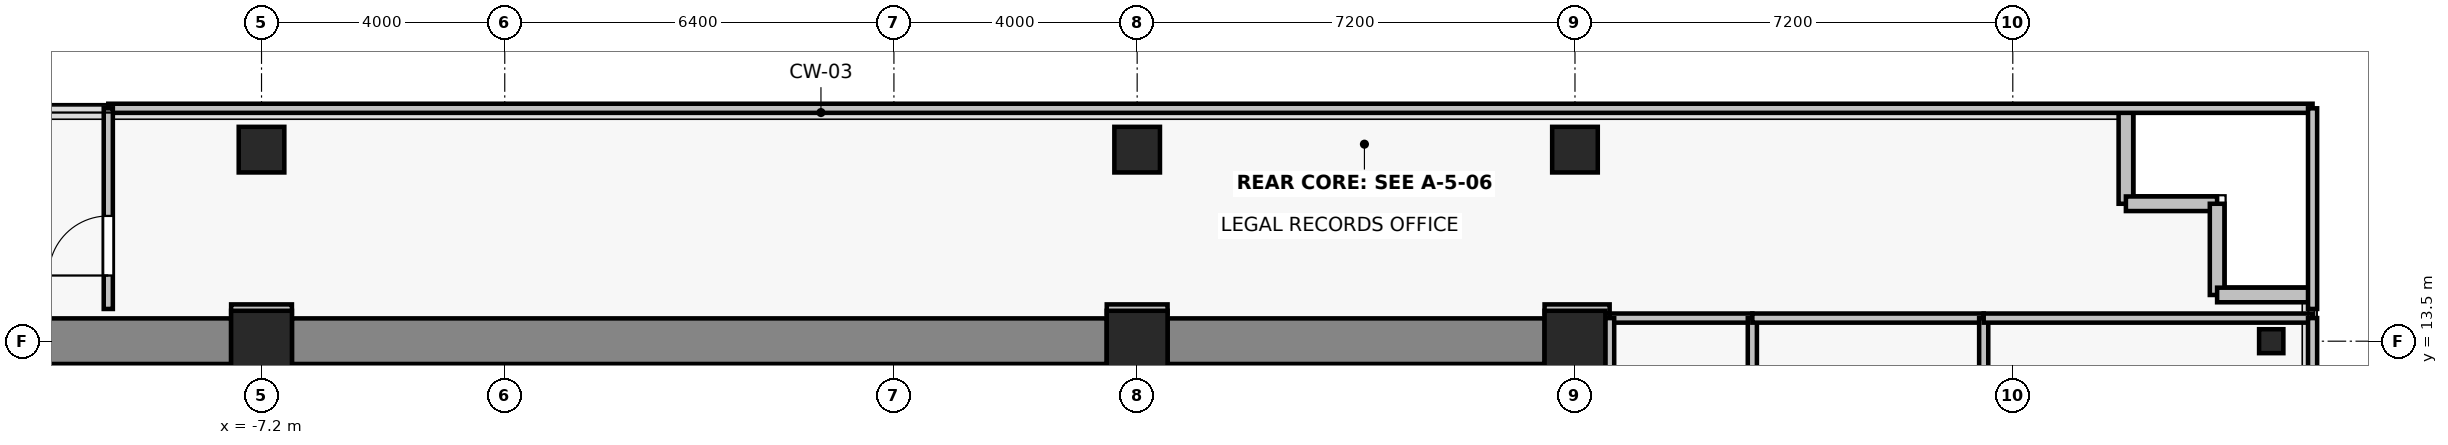
"""IFC4 building model, lengths in metres.
Left out: names, types, materials, properties, quantities, classifications, styles, units other than length and angle.
Written with IfcOpenShell. Run it as: python <this file> out.ifc"""

import sys

from ifc_helpers import new_model, si_unit, direction, frame, frame_2d, origin, origin_2d, place, context, subcontext, project, spatial, rectangle, i_section, extrude, source, transform, mapped, element, fill, save


model = new_model("IFC4")
c1 = context("Model", 3, precision=1e-05, world=origin(), true_north=direction((0.0, 1.0)))
c2 = subcontext(c1, "Body", "Model", "MODEL_VIEW")
j1 = project(units=[si_unit("LENGTHUNIT", "METRE"), si_unit("PLANEANGLEUNIT", "RADIAN")], contexts=[c1])
p1 = place(None, origin())
s1 = spatial("IfcSite", under=j1, at=p1, CompositionType="ELEMENT")
p2 = place(p1, origin())
s2 = spatial("IfcBuilding", under=s1, at=p2, CompositionType="ELEMENT")
p3 = place(p2, frame((0.0, 0.0, 192.4)))
s3 = spatial("IfcBuildingStorey", under=s2, at=p3, CompositionType="ELEMENT", Elevation=192.4)
for number, where, z_axis, x_axis in (
    (1, (-7.2, 13.5, 0.0), (0.0, 0.0, 1.0), (1.0, 0.0, 0.0)),
    (2, (7.2, 13.5, 0.0), (0.0, 0.0, 1.0), (1.0, 0.0, 0.0)),
    (3, (14.4, 13.5, 0.0), (0.0, 0.0, 1.0), (1.0, 0.0, 0.0)),
):
    element("IfcColumn", number, at=place(p3, frame(where, z_axis=z_axis, x_axis=x_axis)), inside=s3, PredefinedType="COLUMN", context=c2, shape_type="SweptSolid", body=[
        extrude(rectangle(XDim=1.0, YDim=1.0, at=origin_2d()), origin(), (0.0, 0.0, 1.0), 3.3),
    ])
for number, where, z_axis, x_axis in (
    (4, (-7.2, 16.65, 0.0), (0.0, 0.0, 1.0), (1.0, 0.0, 0.0)),
    (5, (7.2, 16.65, 0.0), (0.0, 0.0, 1.0), (1.0, 0.0, 0.0)),
    (6, (14.4, 16.65, 0.0), (0.0, 0.0, 1.0), (1.0, 0.0, 0.0)),
):
    element("IfcColumn", number, at=place(p3, frame(where, z_axis=z_axis, x_axis=x_axis)), inside=s3, PredefinedType="COLUMN", context=c2, shape_type="SweptSolid", body=[
        extrude(rectangle(XDim=0.75, YDim=0.75, at=origin_2d()), origin(), (0.0, 0.0, 1.0), 3.3),
    ])
p4 = place(p3, frame((25.85, 13.5, 0.0), z_axis=(0.0, 0.0, 1.0), x_axis=(1.0, 0.0, 0.0)))
e7 = element("IfcColumn", 7, at=p4, inside=s3, PredefinedType="COLUMN", context=c2, shape_type="SweptSolid", body=[
    extrude(i_section(OverallWidth=0.399, OverallDepth=0.394, WebThickness=0.023, FlangeThickness=0.037, FilletRadius=0.015, at=origin_2d()), origin(), (0.0, 0.0, 1.0), 3.3),
])
p5 = place(p3, frame((-13.9, 13.5, 0.0), z_axis=(0.0, 0.0, 1.0), x_axis=(1.0, 0.0, 0.0)))
e8 = element("IfcWall", 8, at=p5, inside=s3, PredefinedType="SHEAR", context=c2, shape_type="SweptSolid", body=[
    extrude(rectangle(XDim=6.2, YDim=0.75, at=frame_2d((3.1, 0.0))), origin(), (0.0, 0.0, 1.0), 3.075),
])
p6 = place(p3, frame((-6.7, 13.5, 0.0), z_axis=(0.0, 0.0, 1.0), x_axis=(1.0, 0.0, 0.0)))
e9 = element("IfcWall", 9, at=p6, inside=s3, PredefinedType="SHEAR", context=c2, shape_type="SweptSolid", body=[
    extrude(rectangle(XDim=13.4, YDim=0.75, at=frame_2d((6.7, 0.0))), origin(), (0.0, 0.0, 1.0), 3.075),
])
p7 = place(p3, frame((7.7, 13.5, 0.0), z_axis=(0.0, 0.0, 1.0), x_axis=(1.0, 0.0, 0.0)))
e10 = element("IfcWall", 10, at=p7, inside=s3, PredefinedType="SHEAR", context=c2, shape_type="SweptSolid", body=[
    extrude(rectangle(XDim=6.2, YDim=0.75, at=frame_2d((3.1, 0.0))), origin(), (0.0, 0.0, 1.0), 3.075),
])
for number, where, z_axis, x_axis in (
    (11, (23.46, 15.76, 0.0), (0.0, 0.0, 1.0), (0.0, 1.0, 0.0)),
    (12, (24.96, 15.76, 0.0), (0.0, 0.0, 1.0), (-1.0, 0.0, 0.0)),
    (13, (24.96, 14.26, 0.0), (0.0, 0.0, 1.0), (0.0, 1.0, 0.0)),
    (14, (26.46, 14.26, 0.0), (0.0, 0.0, 1.0), (-1.0, 0.0, 0.0)),
):
    element("IfcWall", number, at=place(p3, frame(where, z_axis=z_axis, x_axis=x_axis)), inside=s3, PredefinedType="SOLIDWALL", context=c2, shape_type="SweptSolid", body=[
        extrude(rectangle(XDim=1.5, YDim=0.24, at=frame_2d((0.75, 0.0))), origin(), (0.0, 0.0, 1.0), 3.075),
    ])
p8 = place(p3, frame((14.97, 13.88, 0.0), z_axis=(0.0, 0.0, 1.0), x_axis=(1.0, 0.0, 0.0)))
e15 = element("IfcWall", 15, at=p8, inside=s3, PredefinedType="PARTITIONING", context=c2, shape_type="SweptSolid", body=[
    extrude(rectangle(XDim=2.347, YDim=0.15, at=frame_2d((1.173, 0.0))), origin(), (0.0, 0.0, 1.0), 3.075),
])
p9 = place(p3, frame((14.97, 13.0, 0.0), z_axis=(0.0, 0.0, 1.0), x_axis=(0.0, 1.0, 0.0)))
e16 = element("IfcWall", 16, at=p9, inside=s3, PredefinedType="PARTITIONING", context=c2, shape_type="SweptSolid", body=[
    extrude(rectangle(XDim=0.88, YDim=0.15, at=frame_2d((0.44, 0.0))), origin(), (0.0, 0.0, 1.0), 2.565),
])
p10 = place(p3, frame((17.317, 13.88, 0.0), z_axis=(0.0, 0.0, 1.0), x_axis=(0.0, -1.0, 0.0)))
e17 = element("IfcWall", 17, at=p10, inside=s3, PredefinedType="PARTITIONING", context=c2, shape_type="SweptSolid", body=[
    extrude(rectangle(XDim=15.65, YDim=0.15, at=frame_2d((7.825, 0.0))), origin(), (0.0, 0.0, 1.0), 2.565),
])
p11 = place(p3, frame((17.317, 13.88, 0.0), z_axis=(0.0, 0.0, 1.0), x_axis=(1.0, 0.0, 0.0)))
e18 = element("IfcWall", 18, at=p11, inside=s3, PredefinedType="PARTITIONING", context=c2, shape_type="SweptSolid", body=[
    extrude(rectangle(XDim=3.805, YDim=0.15, at=frame_2d((1.902, 0.0))), origin(), (0.0, 0.0, 1.0), 3.075),
])
p12 = place(p3, frame((21.122, 13.88, 0.0), z_axis=(0.0, 0.0, 1.0), x_axis=(0.0, -1.0, 0.0)))
e19 = element("IfcWall", 19, at=p12, inside=s3, PredefinedType="PARTITIONING", context=c2, shape_type="SweptSolid", body=[
    extrude(rectangle(XDim=15.65, YDim=0.15, at=frame_2d((7.825, 0.0))), origin(), (0.0, 0.0, 1.0), 2.565),
])
p13 = place(p3, frame((21.122, 13.88, 0.0), z_axis=(0.0, 0.0, 1.0), x_axis=(1.0, 0.0, 0.0)))
e20 = element("IfcWall", 20, at=p13, inside=s3, PredefinedType="PARTITIONING", context=c2, shape_type="SweptSolid", body=[
    extrude(rectangle(XDim=5.408, YDim=0.15, at=frame_2d((2.704, 0.0))), origin(), (0.0, 0.0, 1.0), 3.075),
])
p14 = place(p3, frame((26.53, 13.88, 0.0), z_axis=(0.0, 0.0, 1.0), x_axis=(0.0, -1.0, 0.0)))
e21 = element("IfcWall", 21, at=p14, inside=s3, PredefinedType="PARTITIONING", context=c2, shape_type="SweptSolid", body=[
    extrude(rectangle(XDim=15.65, YDim=0.15, at=frame_2d((7.825, 0.0))), origin(), (0.0, 0.0, 1.0), 3.075),
])
for number, where, z_axis, x_axis in (
    (22, (-6.7, 14.03, 0.0), (0.0, 0.0, 1.0), (-1.0, 0.0, 0.0)),
    (23, (7.7, 14.03, 0.0), (0.0, 0.0, 1.0), (-1.0, 0.0, 0.0)),
):
    element("IfcWall", number, at=place(p3, frame(where, z_axis=z_axis, x_axis=x_axis)), inside=s3, PredefinedType="PARTITIONING", context=c2, shape_type="SweptSolid", body=[
        extrude(rectangle(XDim=1.0, YDim=0.15, at=frame_2d((0.5, 0.0))), origin(), (0.0, 0.0, 1.0), 2.565),
    ])
p15 = place(p3, frame((14.97, 14.03, 0.0), z_axis=(0.0, 0.0, 1.0), x_axis=(-1.0, 0.0, 0.0)))
e24 = element("IfcWall", 24, at=p15, inside=s3, PredefinedType="PARTITIONING", context=c2, shape_type="SweptSolid", body=[
    extrude(rectangle(XDim=1.07, YDim=0.15, at=frame_2d((0.535, 0.0))), origin(), (0.0, 0.0, 1.0), 2.565),
])
p16 = place(p3, frame((-9.72, 17.33, 0.0), z_axis=(0.0, 0.0, 1.0), x_axis=(1.0, 0.0, 0.0)))
e25 = element("IfcWall", 25, at=p16, inside=s3, PredefinedType="PARTITIONING", context=c2, shape_type="SweptSolid", body=[
    extrude(rectangle(XDim=36.25, YDim=0.15, at=frame_2d((18.125, 0.0))), origin(), (0.0, 0.0, 1.0), 3.075),
])
p17 = place(p3, frame((-9.72, 14.03, 0.0), z_axis=(0.0, 0.0, 1.0), x_axis=(0.0, 1.0, 0.0)))
e26 = element("IfcWall", 26, at=p17, inside=s3, PredefinedType="PARTITIONING", context=c2, shape_type="SweptSolid", body=[
    extrude(rectangle(XDim=3.3, YDim=0.15, at=frame_2d((1.65, 0.0))), origin(), (0.0, 0.0, 1.0), 2.565),
])
p18 = place(p17, frame((0.55, 0.0, 0.0)))
e27 = element("IfcOpeningElement", 27, at=p18, cuts=e26, PredefinedType="OPENING", context=c2, shape_type="SweptSolid", body=[
    extrude(rectangle(XDim=0.98, YDim=2.15, at=frame_2d((0.49, 1.075))), frame((0.0, 0.085, 0.0), z_axis=(0.0, -1.0, 0.0), x_axis=(1.0, 0.0, 0.0)), (0.0, 0.0, 1.0), 0.17),
])
p19 = place(p3, frame((26.53, 17.33, 0.0), z_axis=(0.0, 0.0, 1.0), x_axis=(0.0, -1.0, 0.0)))
e28 = element("IfcWall", 28, at=p19, inside=s3, PredefinedType="PARTITIONING", context=c2, shape_type="SweptSolid", body=[
    extrude(rectangle(XDim=3.3, YDim=0.15, at=frame_2d((1.65, 0.0))), origin(), (0.0, 0.0, 1.0), 3.075),
])
m1 = source(origin(), c2, "Body", "SweptSolid", [
    extrude(rectangle(XDim=0.98, YDim=2.15, at=frame_2d((0.49, 1.075))), frame((0.0, 0.025, 0.0), z_axis=(0.0, -1.0, 0.0), x_axis=(1.0, 0.0, 0.0)), (0.0, 0.0, 1.0), 0.05),
])
p20 = place(p18, origin())
e29 = element("IfcDoor", 29, at=p20, inside=s3, OperationType="SINGLE_SWING_LEFT", PredefinedType="DOOR", context=c2, shape_type="MappedRepresentation", body=[
    mapped(m1, transform((0.0, 0.0, 0.0), x_axis=(1.0, 0.0, 0.0), y_axis=(0.0, 1.0, 0.0), z_axis=(0.0, 0.0, 1.0), scale=1.0)),
])
fill(e27, e29)
save(model, sys.argv[1])
